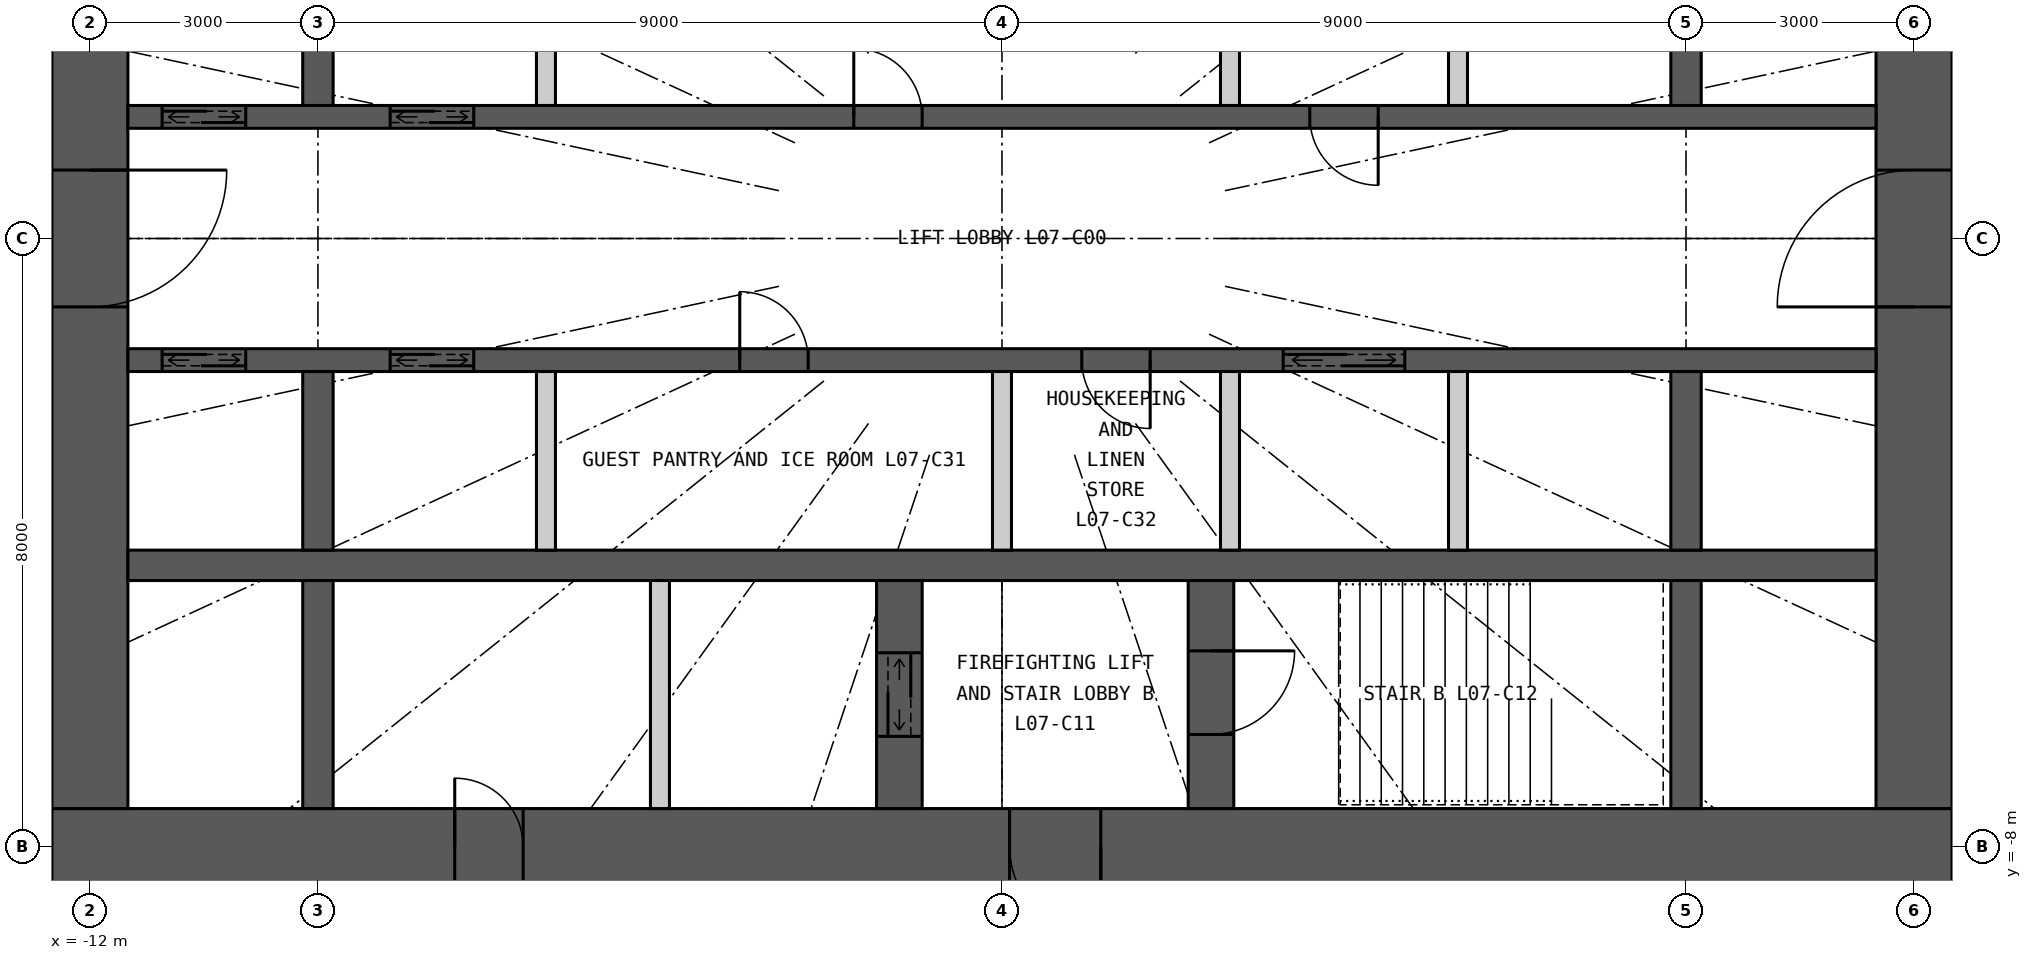
"""IFC4 building model, lengths in metres.
Left out: names, types, materials, properties, quantities, classifications, styles, units other than length and angle.
Written with IfcOpenShell. Run it as: python <this file> out.ifc"""

import sys

from ifc_helpers import new_model, si_unit, direction, frame, frame_2d, origin, place, context, subcontext, project, spatial, rectangle, extrude, element, fill, save


model = new_model("IFC4")
c1 = context("Model", 3, precision=1e-05, world=origin(), true_north=direction((0.0, 1.0)))
c2 = subcontext(c1, "Body", "Model", "MODEL_VIEW")
j1 = project(units=[si_unit("LENGTHUNIT", "METRE"), si_unit("PLANEANGLEUNIT", "RADIAN")], contexts=[c1])
p1 = place(None, origin())
s1 = spatial("IfcSite", under=j1, at=p1, CompositionType="ELEMENT")
p2 = place(p1, origin())
s2 = spatial("IfcBuilding", under=s1, at=p2, CompositionType="ELEMENT")
p3 = place(p2, frame((0.0, 0.0, 36.0)))
s3 = spatial("IfcBuildingStorey", under=s2, at=p3, CompositionType="ELEMENT", Elevation=36.0)
p4 = place(p3, frame((12.5, -8.0, 0.0), z_axis=(0.0, 0.0, 1.0), x_axis=(-1.0, 0.0, 0.0)))
e1 = element("IfcWall", 1, at=p4, inside=s3, PredefinedType="SHEAR", context=c2, shape_type="SweptSolid", body=[
    extrude(rectangle(XDim=25.0, YDim=1.0, at=frame_2d((12.5, 0.0))), origin(), (0.0, 0.0, 1.0), 3.3),
])
p5 = place(p4, frame((11.2, 0.0, 0.0)))
e2 = element("IfcOpeningElement", 2, at=p5, cuts=e1, PredefinedType="OPENING", context=c2, shape_type="SweptSolid", body=[
    extrude(rectangle(XDim=1.2, YDim=2.2, at=frame_2d((0.6, 1.1))), frame((0.0, 0.51, 0.0), z_axis=(0.0, -1.0, 0.0), x_axis=(1.0, 0.0, 0.0)), (0.0, 0.0, 1.0), 1.02),
])
p6 = place(p4, frame((18.8, 0.0, 0.0)))
e3 = element("IfcOpeningElement", 3, at=p6, cuts=e1, PredefinedType="OPENING", context=c2, shape_type="SweptSolid", body=[
    extrude(rectangle(XDim=0.9, YDim=2.2, at=frame_2d((0.45, 1.1))), frame((0.0, 0.51, 0.0), z_axis=(0.0, -1.0, 0.0), x_axis=(1.0, 0.0, 0.0)), (0.0, 0.0, 1.0), 1.02),
])
p7 = place(p3, frame((12.0, -7.5, 0.0), z_axis=(0.0, 0.0, 1.0), x_axis=(0.0, 1.0, 0.0)))
e4 = element("IfcWall", 4, at=p7, inside=s3, PredefinedType="SHEAR", context=c2, shape_type="SweptSolid", body=[
    extrude(rectangle(XDim=15.0, YDim=1.0, at=frame_2d((7.5, 0.0))), origin(), (0.0, 0.0, 1.0), 3.3),
])
p8 = place(p7, frame((6.6, 0.0, 0.0)))
e5 = element("IfcOpeningElement", 5, at=p8, cuts=e4, PredefinedType="OPENING", context=c2, shape_type="SweptSolid", body=[
    extrude(rectangle(XDim=1.8, YDim=2.2, at=frame_2d((0.9, 1.1))), frame((0.0, 0.51, 0.0), z_axis=(0.0, -1.0, 0.0), x_axis=(1.0, 0.0, 0.0)), (0.0, 0.0, 1.0), 1.02),
])
p9 = place(p3, frame((-12.0, 7.5, 0.0), z_axis=(0.0, 0.0, 1.0), x_axis=(0.0, -1.0, 0.0)))
e6 = element("IfcWall", 6, at=p9, inside=s3, PredefinedType="SHEAR", context=c2, shape_type="SweptSolid", body=[
    extrude(rectangle(XDim=15.0, YDim=1.0, at=frame_2d((7.5, 0.0))), origin(), (0.0, 0.0, 1.0), 3.3),
])
p10 = place(p9, frame((6.6, 0.0, 0.0)))
e7 = element("IfcOpeningElement", 7, at=p10, cuts=e6, PredefinedType="OPENING", context=c2, shape_type="SweptSolid", body=[
    extrude(rectangle(XDim=1.8, YDim=2.2, at=frame_2d((0.9, 1.1))), frame((0.0, 0.51, 0.0), z_axis=(0.0, -1.0, 0.0), x_axis=(1.0, 0.0, 0.0)), (0.0, 0.0, 1.0), 1.02),
])
p11 = place(p3, frame((-11.5, 1.6, 0.0), z_axis=(0.0, 0.0, 1.0), x_axis=(1.0, 0.0, 0.0)))
e8 = element("IfcWall", 8, at=p11, inside=s3, PredefinedType="SHEAR", context=c2, shape_type="SweptSolid", body=[
    extrude(rectangle(XDim=23.0, YDim=0.3, at=frame_2d((11.5, 0.0))), origin(), (0.0, 0.0, 1.0), 3.3),
])
p12 = place(p11, frame((0.45, 0.0, 0.0)))
e9 = element("IfcOpeningElement", 9, at=p12, cuts=e8, PredefinedType="OPENING", context=c2, shape_type="SweptSolid", body=[
    extrude(rectangle(XDim=1.1, YDim=2.2, at=frame_2d((0.55, 1.1))), frame((0.0, 0.16, 0.0), z_axis=(0.0, -1.0, 0.0), x_axis=(1.0, 0.0, 0.0)), (0.0, 0.0, 1.0), 0.32),
])
p13 = place(p11, frame((3.45, 0.0, 0.0)))
e10 = element("IfcOpeningElement", 10, at=p13, cuts=e8, PredefinedType="OPENING", context=c2, shape_type="SweptSolid", body=[
    extrude(rectangle(XDim=1.1, YDim=2.2, at=frame_2d((0.55, 1.1))), frame((0.0, 0.16, 0.0), z_axis=(0.0, -1.0, 0.0), x_axis=(1.0, 0.0, 0.0)), (0.0, 0.0, 1.0), 0.32),
])
p14 = place(p11, frame((9.55, 0.0, 0.0)))
e11 = element("IfcOpeningElement", 11, at=p14, cuts=e8, PredefinedType="OPENING", context=c2, shape_type="SweptSolid", body=[
    extrude(rectangle(XDim=0.9, YDim=2.2, at=frame_2d((0.45, 1.1))), frame((0.0, 0.16, 0.0), z_axis=(0.0, -1.0, 0.0), x_axis=(1.0, 0.0, 0.0)), (0.0, 0.0, 1.0), 0.32),
])
p15 = place(p11, frame((15.55, 0.0, 0.0)))
e12 = element("IfcOpeningElement", 12, at=p15, cuts=e8, PredefinedType="OPENING", context=c2, shape_type="SweptSolid", body=[
    extrude(rectangle(XDim=0.9, YDim=2.2, at=frame_2d((0.45, 1.1))), frame((0.0, 0.16, 0.0), z_axis=(0.0, -1.0, 0.0), x_axis=(1.0, 0.0, 0.0)), (0.0, 0.0, 1.0), 0.32),
])
p16 = place(p3, frame((-11.5, -4.3, 0.0), z_axis=(0.0, 0.0, 1.0), x_axis=(1.0, 0.0, 0.0)))
e13 = element("IfcWall", 13, at=p16, inside=s3, PredefinedType="SHEAR", context=c2, shape_type="SweptSolid", body=[
    extrude(rectangle(XDim=23.0, YDim=0.4, at=frame_2d((11.5, 0.0))), origin(), (0.0, 0.0, 1.0), 3.3),
])
p17 = place(p3, frame((-11.5, -1.6, 0.0), z_axis=(0.0, 0.0, 1.0), x_axis=(1.0, 0.0, 0.0)))
e14 = element("IfcWall", 14, at=p17, inside=s3, PredefinedType="SHEAR", context=c2, shape_type="SweptSolid", body=[
    extrude(rectangle(XDim=23.0, YDim=0.3, at=frame_2d((11.5, 0.0))), origin(), (0.0, 0.0, 1.0), 3.3),
])
p18 = place(p17, frame((0.45, 0.0, 0.0)))
e15 = element("IfcOpeningElement", 15, at=p18, cuts=e14, PredefinedType="OPENING", context=c2, shape_type="SweptSolid", body=[
    extrude(rectangle(XDim=1.1, YDim=2.2, at=frame_2d((0.55, 1.1))), frame((0.0, 0.16, 0.0), z_axis=(0.0, -1.0, 0.0), x_axis=(1.0, 0.0, 0.0)), (0.0, 0.0, 1.0), 0.32),
])
p19 = place(p17, frame((3.45, 0.0, 0.0)))
e16 = element("IfcOpeningElement", 16, at=p19, cuts=e14, PredefinedType="OPENING", context=c2, shape_type="SweptSolid", body=[
    extrude(rectangle(XDim=1.1, YDim=2.2, at=frame_2d((0.55, 1.1))), frame((0.0, 0.16, 0.0), z_axis=(0.0, -1.0, 0.0), x_axis=(1.0, 0.0, 0.0)), (0.0, 0.0, 1.0), 0.32),
])
p20 = place(p17, frame((15.2, 0.0, 0.0)))
e17 = element("IfcOpeningElement", 17, at=p20, cuts=e14, PredefinedType="OPENING", context=c2, shape_type="SweptSolid", body=[
    extrude(rectangle(XDim=1.6, YDim=2.4, at=frame_2d((0.8, 1.2))), frame((0.0, 0.16, 0.0), z_axis=(0.0, -1.0, 0.0), x_axis=(1.0, 0.0, 0.0)), (0.0, 0.0, 1.0), 0.32),
])
p21 = place(p17, frame((8.05, 0.0, 0.0)))
e18 = element("IfcOpeningElement", 18, at=p21, cuts=e14, PredefinedType="OPENING", context=c2, shape_type="SweptSolid", body=[
    extrude(rectangle(XDim=0.9, YDim=2.2, at=frame_2d((0.45, 1.1))), frame((0.0, 0.16, 0.0), z_axis=(0.0, -1.0, 0.0), x_axis=(1.0, 0.0, 0.0)), (0.0, 0.0, 1.0), 0.32),
])
p22 = place(p17, frame((12.55, 0.0, 0.0)))
e19 = element("IfcOpeningElement", 19, at=p22, cuts=e14, PredefinedType="OPENING", context=c2, shape_type="SweptSolid", body=[
    extrude(rectangle(XDim=0.9, YDim=2.2, at=frame_2d((0.45, 1.1))), frame((0.0, 0.16, 0.0), z_axis=(0.0, -1.0, 0.0), x_axis=(1.0, 0.0, 0.0)), (0.0, 0.0, 1.0), 0.32),
])
for number, where, z_axis, x_axis in (
    (20, (-9.0, 1.75, 0.0), (0.0, 0.0, 1.0), (0.0, 1.0, 0.0)),
    (21, (-9.0, -4.1, 0.0), (0.0, 0.0, 1.0), (0.0, 1.0, 0.0)),
):
    element("IfcWall", number, at=place(p3, frame(where, z_axis=z_axis, x_axis=x_axis)), inside=s3, PredefinedType="SHEAR", context=c2, shape_type="SweptSolid", body=[
        extrude(rectangle(XDim=2.35, YDim=0.4, at=frame_2d((1.175, 0.0))), origin(), (0.0, 0.0, 1.0), 3.3),
    ])
p23 = place(p3, frame((-9.0, -7.5, 0.0), z_axis=(0.0, 0.0, 1.0), x_axis=(0.0, 1.0, 0.0)))
e22 = element("IfcWall", 22, at=p23, inside=s3, PredefinedType="SHEAR", context=c2, shape_type="SweptSolid", body=[
    extrude(rectangle(XDim=3.0, YDim=0.4, at=frame_2d((1.5, 0.0))), origin(), (0.0, 0.0, 1.0), 3.3),
])
for number, where, z_axis, x_axis in (
    (23, (9.0, 1.75, 0.0), (0.0, 0.0, 1.0), (0.0, 1.0, 0.0)),
    (24, (9.0, -4.1, 0.0), (0.0, 0.0, 1.0), (0.0, 1.0, 0.0)),
):
    element("IfcWall", number, at=place(p3, frame(where, z_axis=z_axis, x_axis=x_axis)), inside=s3, PredefinedType="SHEAR", context=c2, shape_type="SweptSolid", body=[
        extrude(rectangle(XDim=2.35, YDim=0.4, at=frame_2d((1.175, 0.0))), origin(), (0.0, 0.0, 1.0), 3.3),
    ])
p24 = place(p3, frame((9.0, -7.5, 0.0), z_axis=(0.0, 0.0, 1.0), x_axis=(0.0, 1.0, 0.0)))
e25 = element("IfcWall", 25, at=p24, inside=s3, PredefinedType="SHEAR", context=c2, shape_type="SweptSolid", body=[
    extrude(rectangle(XDim=3.0, YDim=0.4, at=frame_2d((1.5, 0.0))), origin(), (0.0, 0.0, 1.0), 3.3),
])
p25 = place(p3, frame((2.75, -7.5, 0.0), z_axis=(0.0, 0.0, 1.0), x_axis=(0.0, 1.0, 0.0)))
e26 = element("IfcWall", 26, at=p25, inside=s3, PredefinedType="SHEAR", context=c2, shape_type="SweptSolid", body=[
    extrude(rectangle(XDim=3.0, YDim=0.6, at=frame_2d((1.5, 0.0))), origin(), (0.0, 0.0, 1.0), 3.3),
])
p26 = place(p25, frame((0.975, 0.0, 0.0)))
e27 = element("IfcOpeningElement", 27, at=p26, cuts=e26, PredefinedType="OPENING", context=c2, shape_type="SweptSolid", body=[
    extrude(rectangle(XDim=1.1, YDim=2.2, at=frame_2d((0.55, 1.1))), frame((0.0, 0.31, 0.0), z_axis=(0.0, -1.0, 0.0), x_axis=(1.0, 0.0, 0.0)), (0.0, 0.0, 1.0), 0.62),
])
p27 = place(p3, frame((-1.35, -7.5, 0.0), z_axis=(0.0, 0.0, 1.0), x_axis=(0.0, 1.0, 0.0)))
e28 = element("IfcWall", 28, at=p27, inside=s3, PredefinedType="SHEAR", context=c2, shape_type="SweptSolid", body=[
    extrude(rectangle(XDim=3.0, YDim=0.6, at=frame_2d((1.5, 0.0))), origin(), (0.0, 0.0, 1.0), 3.3),
])
p28 = place(p27, frame((0.95, 0.0, 0.0)))
e29 = element("IfcOpeningElement", 29, at=p28, cuts=e28, PredefinedType="OPENING", context=c2, shape_type="SweptSolid", body=[
    extrude(rectangle(XDim=1.1, YDim=2.2, at=frame_2d((0.55, 1.1))), frame((0.0, 0.31, 0.0), z_axis=(0.0, -1.0, 0.0), x_axis=(1.0, 0.0, 0.0)), (0.0, 0.0, 1.0), 0.62),
])
p29 = place(p3, frame((-4.5, -7.5, 0.0), z_axis=(0.0, 0.0, 1.0), x_axis=(0.0, 1.0, 0.0)))
e30 = element("IfcWall", 30, at=p29, inside=s3, PredefinedType="PARTITIONING", context=c2, shape_type="SweptSolid", body=[
    extrude(rectangle(XDim=3.0, YDim=0.25, at=frame_2d((1.5, 0.0))), origin(), (0.0, 0.0, 1.0), 3.3),
])
for number, where, z_axis, x_axis in (
    (31, (-6.0, 1.75, 0.0), (0.0, 0.0, 1.0), (0.0, 1.0, 0.0)),
    (32, (3.0, 1.75, 0.0), (0.0, 0.0, 1.0), (0.0, 1.0, 0.0)),
    (33, (6.0, 1.75, 0.0), (0.0, 0.0, 1.0), (0.0, 1.0, 0.0)),
    (34, (-6.0, -4.1, 0.0), (0.0, 0.0, 1.0), (0.0, 1.0, 0.0)),
    (35, (0.0, -4.1, 0.0), (0.0, 0.0, 1.0), (0.0, 1.0, 0.0)),
    (36, (3.0, -4.1, 0.0), (0.0, 0.0, 1.0), (0.0, 1.0, 0.0)),
    (37, (6.0, -4.1, 0.0), (0.0, 0.0, 1.0), (0.0, 1.0, 0.0)),
):
    element("IfcWall", number, at=place(p3, frame(where, z_axis=z_axis, x_axis=x_axis)), inside=s3, PredefinedType="PARTITIONING", context=c2, shape_type="SweptSolid", body=[
        extrude(rectangle(XDim=2.35, YDim=0.25, at=frame_2d((1.175, 0.0))), origin(), (0.0, 0.0, 1.0), 3.3),
    ])
p30 = place(p5, origin())
e38 = element("IfcDoor", 38, at=p30, inside=s3, OperationType="SINGLE_SWING_LEFT", PredefinedType="DOOR", context=c2, shape_type="SweptSolid", body=[
    extrude(rectangle(XDim=1.2, YDim=2.2, at=frame_2d((0.6, 1.1))), frame((0.0, 0.025, 0.0), z_axis=(0.0, -1.0, 0.0), x_axis=(1.0, 0.0, 0.0)), (0.0, 0.0, 1.0), 0.05),
])
fill(e2, e38)
p31 = place(p26, origin())
e39 = element("IfcDoor", 39, at=p31, inside=s3, OperationType="SINGLE_SWING_RIGHT", PredefinedType="DOOR", context=c2, shape_type="SweptSolid", body=[
    extrude(rectangle(XDim=1.1, YDim=2.2, at=frame_2d((0.55, 1.1))), frame((0.0, 0.025, 0.0), z_axis=(0.0, -1.0, 0.0), x_axis=(1.0, 0.0, 0.0)), (0.0, 0.0, 1.0), 0.05),
])
fill(e27, e39)
p32 = place(p28, origin())
e40 = element("IfcDoor", 40, at=p32, inside=s3, OperationType="DOUBLE_DOOR_SLIDING", PredefinedType="DOOR", context=c2, shape_type="SweptSolid", body=[
    extrude(rectangle(XDim=1.1, YDim=2.2, at=frame_2d((0.55, 1.1))), frame((0.0, 0.025, 0.0), z_axis=(0.0, -1.0, 0.0), x_axis=(1.0, 0.0, 0.0)), (0.0, 0.0, 1.0), 0.05),
])
fill(e29, e40)
p33 = place(p6, origin())
e41 = element("IfcDoor", 41, at=p33, inside=s3, OperationType="SINGLE_SWING_RIGHT", PredefinedType="DOOR", context=c2, shape_type="SweptSolid", body=[
    extrude(rectangle(XDim=0.9, YDim=2.2, at=frame_2d((0.45, 1.1))), frame((0.0, 0.025, 0.0), z_axis=(0.0, -1.0, 0.0), x_axis=(1.0, 0.0, 0.0)), (0.0, 0.0, 1.0), 0.05),
])
fill(e3, e41)
p34 = place(p12, origin())
e42 = element("IfcDoor", 42, at=p34, inside=s3, OperationType="DOUBLE_DOOR_SLIDING", PredefinedType="DOOR", context=c2, shape_type="SweptSolid", body=[
    extrude(rectangle(XDim=1.1, YDim=2.2, at=frame_2d((0.55, 1.1))), frame((0.0, 0.025, 0.0), z_axis=(0.0, -1.0, 0.0), x_axis=(1.0, 0.0, 0.0)), (0.0, 0.0, 1.0), 0.05),
])
fill(e9, e42)
p35 = place(p13, origin())
e43 = element("IfcDoor", 43, at=p35, inside=s3, OperationType="DOUBLE_DOOR_SLIDING", PredefinedType="DOOR", context=c2, shape_type="SweptSolid", body=[
    extrude(rectangle(XDim=1.1, YDim=2.2, at=frame_2d((0.55, 1.1))), frame((0.0, 0.025, 0.0), z_axis=(0.0, -1.0, 0.0), x_axis=(1.0, 0.0, 0.0)), (0.0, 0.0, 1.0), 0.05),
])
fill(e10, e43)
p36 = place(p18, origin())
e44 = element("IfcDoor", 44, at=p36, inside=s3, OperationType="DOUBLE_DOOR_SLIDING", PredefinedType="DOOR", context=c2, shape_type="SweptSolid", body=[
    extrude(rectangle(XDim=1.1, YDim=2.2, at=frame_2d((0.55, 1.1))), frame((0.0, 0.025, 0.0), z_axis=(0.0, -1.0, 0.0), x_axis=(1.0, 0.0, 0.0)), (0.0, 0.0, 1.0), 0.05),
])
fill(e15, e44)
p37 = place(p19, origin())
e45 = element("IfcDoor", 45, at=p37, inside=s3, OperationType="DOUBLE_DOOR_SLIDING", PredefinedType="DOOR", context=c2, shape_type="SweptSolid", body=[
    extrude(rectangle(XDim=1.1, YDim=2.2, at=frame_2d((0.55, 1.1))), frame((0.0, 0.025, 0.0), z_axis=(0.0, -1.0, 0.0), x_axis=(1.0, 0.0, 0.0)), (0.0, 0.0, 1.0), 0.05),
])
fill(e16, e45)
p38 = place(p20, origin())
e46 = element("IfcDoor", 46, at=p38, inside=s3, OperationType="DOUBLE_DOOR_SLIDING", PredefinedType="DOOR", context=c2, shape_type="SweptSolid", body=[
    extrude(rectangle(XDim=1.6, YDim=2.4, at=frame_2d((0.8, 1.2))), frame((0.0, 0.025, 0.0), z_axis=(0.0, -1.0, 0.0), x_axis=(1.0, 0.0, 0.0)), (0.0, 0.0, 1.0), 0.05),
])
fill(e17, e46)
p39 = place(p14, origin())
e47 = element("IfcDoor", 47, at=p39, inside=s3, OperationType="SINGLE_SWING_LEFT", PredefinedType="DOOR", context=c2, shape_type="SweptSolid", body=[
    extrude(rectangle(XDim=0.9, YDim=2.2, at=frame_2d((0.45, 1.1))), frame((0.0, 0.025, 0.0), z_axis=(0.0, -1.0, 0.0), x_axis=(1.0, 0.0, 0.0)), (0.0, 0.0, 1.0), 0.05),
])
fill(e11, e47)
p40 = place(p15, origin())
e48 = element("IfcDoor", 48, at=p40, inside=s3, OperationType="SINGLE_SWING_RIGHT", PredefinedType="DOOR", context=c2, shape_type="SweptSolid", body=[
    extrude(rectangle(XDim=0.9, YDim=2.2, at=frame_2d((0.45, 1.1))), frame((0.0, 0.025, 0.0), z_axis=(0.0, -1.0, 0.0), x_axis=(1.0, 0.0, 0.0)), (0.0, 0.0, 1.0), 0.05),
])
fill(e12, e48)
p41 = place(p21, origin())
e49 = element("IfcDoor", 49, at=p41, inside=s3, OperationType="SINGLE_SWING_LEFT", PredefinedType="DOOR", context=c2, shape_type="SweptSolid", body=[
    extrude(rectangle(XDim=0.9, YDim=2.2, at=frame_2d((0.45, 1.1))), frame((0.0, 0.025, 0.0), z_axis=(0.0, -1.0, 0.0), x_axis=(1.0, 0.0, 0.0)), (0.0, 0.0, 1.0), 0.05),
])
fill(e18, e49)
p42 = place(p22, origin())
e50 = element("IfcDoor", 50, at=p42, inside=s3, OperationType="SINGLE_SWING_RIGHT", PredefinedType="DOOR", context=c2, shape_type="SweptSolid", body=[
    extrude(rectangle(XDim=0.9, YDim=2.2, at=frame_2d((0.45, 1.1))), frame((0.0, 0.025, 0.0), z_axis=(0.0, -1.0, 0.0), x_axis=(1.0, 0.0, 0.0)), (0.0, 0.0, 1.0), 0.05),
])
fill(e19, e50)
p43 = place(p8, origin())
e51 = element("IfcDoor", 51, at=p43, inside=s3, OperationType="DOUBLE_DOOR_DOUBLE_SWING", PredefinedType="DOOR", context=c2, shape_type="SweptSolid", body=[
    extrude(rectangle(XDim=1.8, YDim=2.2, at=frame_2d((0.9, 1.1))), frame((0.0, 0.025, 0.0), z_axis=(0.0, -1.0, 0.0), x_axis=(1.0, 0.0, 0.0)), (0.0, 0.0, 1.0), 0.05),
])
fill(e5, e51)
p44 = place(p10, origin())
e52 = element("IfcDoor", 52, at=p44, inside=s3, OperationType="DOUBLE_DOOR_DOUBLE_SWING", PredefinedType="DOOR", context=c2, shape_type="SweptSolid", body=[
    extrude(rectangle(XDim=1.8, YDim=2.2, at=frame_2d((0.9, 1.1))), frame((0.0, 0.025, 0.0), z_axis=(0.0, -1.0, 0.0), x_axis=(1.0, 0.0, 0.0)), (0.0, 0.0, 1.0), 0.05),
])
fill(e7, e52)
save(model, sys.argv[1])
